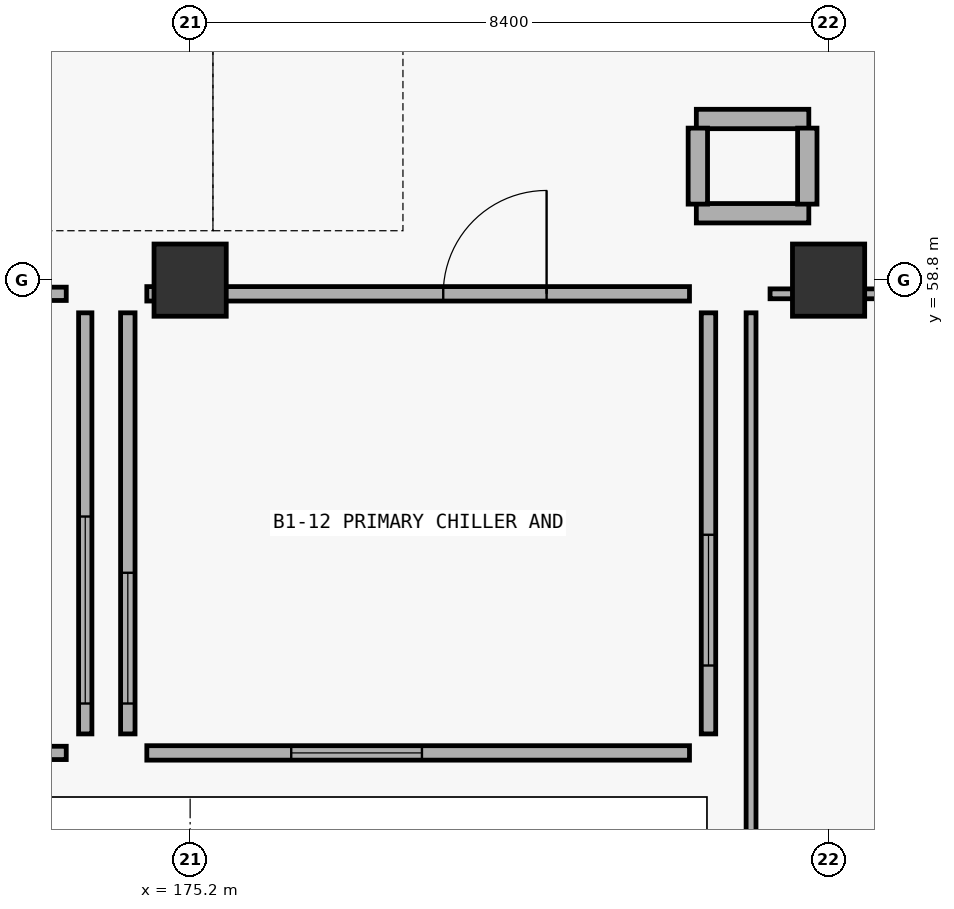
"""IFC4 building model, lengths in metres.
Left out: names, types, materials, properties, quantities, classifications, styles, units other than length and angle.
Written with IfcOpenShell. Run it as: python <this file> out.ifc"""

import sys

from ifc_helpers import new_model, si_unit, direction, frame, frame_2d, origin, origin_2d, place, context, subcontext, project, spatial, rectangle, extrude, element, fill, save


model = new_model("IFC4")
c1 = context("Model", 3, precision=1e-05, world=origin(), true_north=direction((0.0, 1.0)))
c2 = subcontext(c1, "Body", "Model", "MODEL_VIEW")
j1 = project(units=[si_unit("LENGTHUNIT", "METRE"), si_unit("PLANEANGLEUNIT", "RADIAN")], contexts=[c1])
p1 = place(None, origin())
s1 = spatial("IfcSite", under=j1, at=p1, CompositionType="ELEMENT")
p2 = place(p1, origin())
s2 = spatial("IfcBuilding", under=s1, at=p2, CompositionType="ELEMENT")
p3 = place(p2, frame((0.0, 0.0, -4.8)))
s3 = spatial("IfcBuildingStorey", under=s2, at=p3, CompositionType="ELEMENT", Elevation=-4.8)
for number, where, z_axis, x_axis in (
    (1, (175.2, 58.8, 0.0), (0.0, 0.0, 1.0), (1.0, 0.0, 0.0)),
    (2, (183.6, 58.8, 0.0), (0.0, 0.0, 1.0), (1.0, 0.0, 0.0)),
):
    element("IfcColumn", number, at=place(p3, frame(where, z_axis=z_axis, x_axis=x_axis)), inside=s3, PredefinedType="COLUMN", context=c2, shape_type="SweptSolid", body=[
        extrude(rectangle(XDim=0.95, YDim=0.95, at=origin_2d()), origin(), (0.0, 0.0, 1.0), 4.8),
    ])
for number, where, z_axis, x_axis in (
    (3, (181.86, 60.92, 0.0), (0.0, 0.0, 1.0), (1.0, 0.0, 0.0)),
    (4, (181.86, 59.68, 0.0), (0.0, 0.0, 1.0), (1.0, 0.0, 0.0)),
):
    element("IfcWall", number, at=place(p3, frame(where, z_axis=z_axis, x_axis=x_axis)), inside=s3, PredefinedType="PARTITIONING", context=c2, shape_type="SweptSolid", body=[
        extrude(rectangle(XDim=1.48, YDim=0.255, at=frame_2d((0.74, 0.0))), origin(), (0.0, 0.0, 1.0), 3.665),
    ])
p4 = place(p3, frame((181.88, 59.8, 0.0), z_axis=(0.0, 0.0, 1.0), x_axis=(0.0, 1.0, 0.0)))
e5 = element("IfcWall", 5, at=p4, inside=s3, PredefinedType="PARTITIONING", context=c2, shape_type="SweptSolid", body=[
    extrude(rectangle(XDim=1.0, YDim=0.255, at=frame_2d((0.5, 0.0))), origin(), (0.0, 0.0, 1.0), 4.36),
])
p5 = place(p3, frame((183.32, 59.8, 0.0), z_axis=(0.0, 0.0, 1.0), x_axis=(0.0, 1.0, 0.0)))
e6 = element("IfcWall", 6, at=p5, inside=s3, PredefinedType="PARTITIONING", context=c2, shape_type="SweptSolid", body=[
    extrude(rectangle(XDim=1.0, YDim=0.255, at=frame_2d((0.5, 0.0))), origin(), (0.0, 0.0, 1.0), 3.665),
])
p6 = place(p3, frame((182.83, 58.62, 0.0), z_axis=(0.0, 0.0, 1.0), x_axis=(1.0, 0.0, 0.0)))
e7 = element("IfcWall", 7, at=p6, inside=s3, PredefinedType="PARTITIONING", context=c2, shape_type="SweptSolid", body=[
    extrude(rectangle(XDim=16.54, YDim=0.13, at=frame_2d((8.27, 0.0))), origin(), (0.0, 0.0, 1.0), 2.96),
])
p7 = place(p6, frame((4.4, 0.0, 0.0)))
e8 = element("IfcOpeningElement", 8, at=p7, cuts=e7, PredefinedType="OPENING", context=c2, shape_type="SweptSolid", body=[
    extrude(rectangle(XDim=1.06, YDim=2.2, at=frame_2d((0.53, 1.1))), frame((0.0, 0.075, 0.0), z_axis=(0.0, -1.0, 0.0), x_axis=(1.0, 0.0, 0.0)), (0.0, 0.0, 1.0), 0.15),
])
p8 = place(p3, frame((182.58, 32.23, 0.0), z_axis=(0.0, 0.0, 1.0), x_axis=(0.0, 1.0, 0.0)))
e9 = element("IfcWall", 9, at=p8, inside=s3, PredefinedType="PARTITIONING", context=c2, shape_type="SweptSolid", body=[
    extrude(rectangle(XDim=26.14, YDim=0.13, at=frame_2d((13.07, 0.0))), origin(), (0.0, 0.0, 1.0), 2.96),
])
p9 = place(p8, frame((12.4, 0.0, 0.9)))
e10 = element("IfcOpeningElement", 10, at=p9, cuts=e9, PredefinedType="OPENING", context=c2, shape_type="SweptSolid", body=[
    extrude(rectangle(XDim=1.86, YDim=1.28, at=frame_2d((0.93, 0.64))), frame((0.0, 0.075, 0.0), z_axis=(0.0, -1.0, 0.0), x_axis=(1.0, 0.0, 0.0)), (0.0, 0.0, 1.0), 0.15),
])
p10 = place(p3, frame((152.63, 58.62, 0.0), z_axis=(0.0, 0.0, 1.0), x_axis=(1.0, 0.0, 0.0)))
e11 = element("IfcWall", 11, at=p10, inside=s3, PredefinedType="PARTITIONING", context=c2, shape_type="SweptSolid", body=[
    extrude(rectangle(XDim=20.94, YDim=0.175, at=frame_2d((10.47, 0.0))), origin(), (0.0, 0.0, 1.0), 3.41),
])
p11 = place(p10, frame((17.15, 0.0, 0.0)))
e12 = element("IfcOpeningElement", 12, at=p11, cuts=e11, PredefinedType="OPENING", context=c2, shape_type="SweptSolid", body=[
    extrude(rectangle(XDim=2.38, YDim=2.74, at=frame_2d((1.19, 1.37))), frame((0.0, 0.097, 0.0), z_axis=(0.0, -1.0, 0.0), x_axis=(1.0, 0.0, 0.0)), (0.0, 0.0, 1.0), 0.195),
])
p12 = place(p3, frame((152.63, 52.58, 0.0), z_axis=(0.0, 0.0, 1.0), x_axis=(1.0, 0.0, 0.0)))
e13 = element("IfcWall", 13, at=p12, inside=s3, PredefinedType="PARTITIONING", context=c2, shape_type="SweptSolid", body=[
    extrude(rectangle(XDim=20.94, YDim=0.175, at=frame_2d((10.47, 0.0))), origin(), (0.0, 0.0, 1.0), 3.465),
])
p13 = place(p12, frame((17.15, 0.0, 0.9)))
e14 = element("IfcOpeningElement", 14, at=p13, cuts=e13, PredefinedType="OPENING", context=c2, shape_type="SweptSolid", body=[
    extrude(rectangle(XDim=2.46, YDim=1.38, at=frame_2d((1.23, 0.69))), frame((0.0, 0.097, 0.0), z_axis=(0.0, -1.0, 0.0), x_axis=(1.0, 0.0, 0.0)), (0.0, 0.0, 1.0), 0.195),
])
p14 = place(p3, frame((173.82, 52.83, 0.0), z_axis=(0.0, 0.0, 1.0), x_axis=(0.0, 1.0, 0.0)))
e15 = element("IfcWall", 15, at=p14, inside=s3, PredefinedType="PARTITIONING", context=c2, shape_type="SweptSolid", body=[
    extrude(rectangle(XDim=5.54, YDim=0.175, at=frame_2d((2.77, 0.0))), origin(), (0.0, 0.0, 1.0), 3.41),
])
p15 = place(p14, frame((0.4, 0.0, 0.9)))
e16 = element("IfcOpeningElement", 16, at=p15, cuts=e15, PredefinedType="OPENING", context=c2, shape_type="SweptSolid", body=[
    extrude(rectangle(XDim=2.46, YDim=1.38, at=frame_2d((1.23, 0.69))), frame((0.0, 0.097, 0.0), z_axis=(0.0, -1.0, 0.0), x_axis=(1.0, 0.0, 0.0)), (0.0, 0.0, 1.0), 0.195),
])
p16 = place(p3, frame((174.63, 58.62, 0.0), z_axis=(0.0, 0.0, 1.0), x_axis=(1.0, 0.0, 0.0)))
e17 = element("IfcWall", 17, at=p16, inside=s3, PredefinedType="PARTITIONING", context=c2, shape_type="SweptSolid", body=[
    extrude(rectangle(XDim=7.14, YDim=0.19, at=frame_2d((3.57, 0.0))), origin(), (0.0, 0.0, 1.0), 2.96),
])
p17 = place(p16, frame((3.9, 0.0, 0.0)))
e18 = element("IfcOpeningElement", 18, at=p17, cuts=e17, PredefinedType="OPENING", context=c2, shape_type="SweptSolid", body=[
    extrude(rectangle(XDim=1.36, YDim=2.36, at=frame_2d((0.68, 1.18))), frame((0.0, 0.105, 0.0), z_axis=(0.0, -1.0, 0.0), x_axis=(1.0, 0.0, 0.0)), (0.0, 0.0, 1.0), 0.21),
])
p18 = place(p3, frame((174.63, 52.58, 0.0), z_axis=(0.0, 0.0, 1.0), x_axis=(1.0, 0.0, 0.0)))
e19 = element("IfcWall", 19, at=p18, inside=s3, PredefinedType="PARTITIONING", context=c2, shape_type="SweptSolid", body=[
    extrude(rectangle(XDim=7.14, YDim=0.19, at=frame_2d((3.57, 0.0))), origin(), (0.0, 0.0, 1.0), 4.36),
])
p19 = place(p18, frame((1.9, 0.0, 0.9)))
e20 = element("IfcOpeningElement", 20, at=p19, cuts=e19, PredefinedType="OPENING", context=c2, shape_type="SweptSolid", body=[
    extrude(rectangle(XDim=1.72, YDim=1.46, at=frame_2d((0.86, 0.73))), frame((0.0, 0.105, 0.0), z_axis=(0.0, -1.0, 0.0), x_axis=(1.0, 0.0, 0.0)), (0.0, 0.0, 1.0), 0.21),
])
p20 = place(p3, frame((174.38, 52.83, 0.0), z_axis=(0.0, 0.0, 1.0), x_axis=(0.0, 1.0, 0.0)))
e21 = element("IfcWall", 21, at=p20, inside=s3, PredefinedType="PARTITIONING", context=c2, shape_type="SweptSolid", body=[
    extrude(rectangle(XDim=5.54, YDim=0.19, at=frame_2d((2.77, 0.0))), origin(), (0.0, 0.0, 1.0), 3.41),
])
p21 = place(p20, frame((0.4, 0.0, 0.9)))
e22 = element("IfcOpeningElement", 22, at=p21, cuts=e21, PredefinedType="OPENING", context=c2, shape_type="SweptSolid", body=[
    extrude(rectangle(XDim=1.72, YDim=1.46, at=frame_2d((0.86, 0.73))), frame((0.0, 0.105, 0.0), z_axis=(0.0, -1.0, 0.0), x_axis=(1.0, 0.0, 0.0)), (0.0, 0.0, 1.0), 0.21),
])
p22 = place(p3, frame((182.02, 52.83, 0.0), z_axis=(0.0, 0.0, 1.0), x_axis=(0.0, 1.0, 0.0)))
e23 = element("IfcWall", 23, at=p22, inside=s3, PredefinedType="PARTITIONING", context=c2, shape_type="SweptSolid", body=[
    extrude(rectangle(XDim=5.54, YDim=0.19, at=frame_2d((2.77, 0.0))), origin(), (0.0, 0.0, 1.0), 2.96),
])
p23 = place(p22, frame((0.9, 0.0, 0.9)))
e24 = element("IfcOpeningElement", 24, at=p23, cuts=e23, PredefinedType="OPENING", context=c2, shape_type="SweptSolid", body=[
    extrude(rectangle(XDim=1.72, YDim=1.46, at=frame_2d((0.86, 0.73))), frame((0.0, 0.105, 0.0), z_axis=(0.0, -1.0, 0.0), x_axis=(1.0, 0.0, 0.0)), (0.0, 0.0, 1.0), 0.21),
])
p24 = place(p15, origin())
e25 = element("IfcWindow", 25, at=p24, inside=s3, PartitioningType="SINGLE_PANEL", PredefinedType="WINDOW", context=c2, shape_type="SweptSolid", body=[
    extrude(rectangle(XDim=2.46, YDim=1.38, at=frame_2d((1.23, 0.69))), frame((0.0, 0.03, 0.0), z_axis=(0.0, -1.0, 0.0), x_axis=(1.0, 0.0, 0.0)), (0.0, 0.0, 1.0), 0.06),
])
fill(e16, e25)
p25 = place(p17, origin())
e26 = element("IfcDoor", 26, at=p25, inside=s3, OperationType="SINGLE_SWING_RIGHT", PredefinedType="DOOR", context=c2, shape_type="SweptSolid", body=[
    extrude(rectangle(XDim=1.36, YDim=2.36, at=frame_2d((0.68, 1.18))), frame((0.0, 0.025, 0.0), z_axis=(0.0, -1.0, 0.0), x_axis=(1.0, 0.0, 0.0)), (0.0, 0.0, 1.0), 0.05),
])
fill(e18, e26)
p26 = place(p19, origin())
e27 = element("IfcWindow", 27, at=p26, inside=s3, PartitioningType="SINGLE_PANEL", PredefinedType="WINDOW", context=c2, shape_type="SweptSolid", body=[
    extrude(rectangle(XDim=1.72, YDim=1.46, at=frame_2d((0.86, 0.73))), frame((0.0, 0.03, 0.0), z_axis=(0.0, -1.0, 0.0), x_axis=(1.0, 0.0, 0.0)), (0.0, 0.0, 1.0), 0.06),
])
fill(e20, e27)
p27 = place(p21, origin())
e28 = element("IfcWindow", 28, at=p27, inside=s3, PartitioningType="SINGLE_PANEL", PredefinedType="WINDOW", context=c2, shape_type="SweptSolid", body=[
    extrude(rectangle(XDim=1.72, YDim=1.46, at=frame_2d((0.86, 0.73))), frame((0.0, 0.03, 0.0), z_axis=(0.0, -1.0, 0.0), x_axis=(1.0, 0.0, 0.0)), (0.0, 0.0, 1.0), 0.06),
])
fill(e22, e28)
p28 = place(p23, origin())
e29 = element("IfcWindow", 29, at=p28, inside=s3, PartitioningType="SINGLE_PANEL", PredefinedType="WINDOW", context=c2, shape_type="SweptSolid", body=[
    extrude(rectangle(XDim=1.72, YDim=1.46, at=frame_2d((0.86, 0.73))), frame((0.0, 0.03, 0.0), z_axis=(0.0, -1.0, 0.0), x_axis=(1.0, 0.0, 0.0)), (0.0, 0.0, 1.0), 0.06),
])
fill(e24, e29)
save(model, sys.argv[1])
